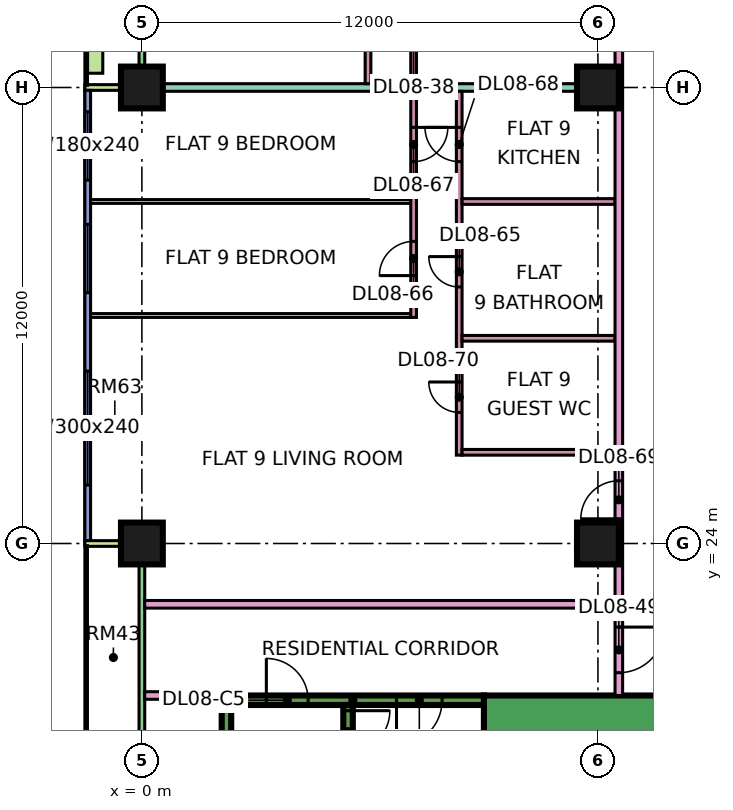
"""IFC4 building model, lengths in metres.
Left out: names, types, materials, properties, quantities, classifications, styles, units other than length and angle.
Written with IfcOpenShell. Run it as: python <this file> out.ifc"""

import sys

from ifc_helpers import new_model, si_unit, direction, frame, frame_2d, origin, origin_2d, place, context, subcontext, project, spatial, rectangle, extrude, element, fill, save


model = new_model("IFC4")
c1 = context("Model", 3, precision=1e-05, world=origin(), true_north=direction((0.0, 1.0)))
c2 = subcontext(c1, "Body", "Model", "MODEL_VIEW")
j1 = project(units=[si_unit("LENGTHUNIT", "METRE"), si_unit("PLANEANGLEUNIT", "RADIAN")], contexts=[c1])
p1 = place(None, origin())
s1 = spatial("IfcSite", under=j1, at=p1, CompositionType="ELEMENT")
p2 = place(p1, origin())
s2 = spatial("IfcBuilding", under=s1, at=p2, CompositionType="ELEMENT")
p3 = place(p2, frame((0.0, 0.0, 45.15)))
s3 = spatial("IfcBuildingStorey", under=s2, at=p3, CompositionType="ELEMENT", Elevation=45.15)
p4 = place(p3, frame((0.0, 24.0, 0.0), z_axis=(0.0, 0.0, 1.0), x_axis=(1.0, 0.0, 0.0)))
e1 = element("IfcColumn", 1, at=p4, inside=s3, PredefinedType="COLUMN", context=c2, shape_type="SweptSolid", body=[
    extrude(rectangle(XDim=1.1, YDim=1.1, at=origin_2d()), origin(), (0.0, 0.0, 1.0), 3.75),
])
p5 = place(p3, frame((0.0, 36.0, 0.0), z_axis=(0.0, 0.0, 1.0), x_axis=(1.0, 0.0, 0.0)))
e2 = element("IfcColumn", 2, at=p5, inside=s3, PredefinedType="COLUMN", context=c2, shape_type="SweptSolid", body=[
    extrude(rectangle(XDim=1.1, YDim=1.1, at=origin_2d()), origin(), (0.0, 0.0, 1.0), 3.75),
])
for number, where, z_axis, x_axis in (
    (3, (12.0, 24.0, 0.0), (0.0, 0.0, 1.0), (1.0, 0.0, 0.0)),
    (4, (12.0, 36.0, 0.0), (0.0, 0.0, 1.0), (1.0, 0.0, 0.0)),
):
    element("IfcColumn", number, at=place(p3, frame(where, z_axis=z_axis, x_axis=x_axis)), inside=s3, PredefinedType="COLUMN", context=c2, shape_type="SweptSolid", body=[
        extrude(rectangle(XDim=1.1, YDim=1.1, at=origin_2d()), origin(), (0.0, 0.0, 1.0), 3.75),
    ])
p6 = place(p3, frame((9.0, 19.45, 0.0), z_axis=(0.0, 0.0, 1.0), x_axis=(1.0, 0.0, 0.0)))
e5 = element("IfcWall", 5, at=p6, inside=s3, PredefinedType="SHEAR", context=c2, shape_type="SweptSolid", body=[
    extrude(rectangle(XDim=25.0, YDim=1.1, at=frame_2d((12.5, 0.0))), origin(), (0.0, 0.0, 1.0), 3.75),
])
p7 = place(p6, frame((19.1, 0.0, 0.0)))
e6 = element("IfcOpeningElement", 6, at=p7, cuts=e5, PredefinedType="OPENING", context=c2, shape_type="SweptSolid", body=[
    extrude(rectangle(XDim=1.8, YDim=2.4, at=frame_2d((0.9, 1.2))), frame((0.0, 0.56, 0.0), z_axis=(0.0, -1.0, 0.0), x_axis=(1.0, 0.0, 0.0)), (0.0, 0.0, 1.0), 1.12),
])
p8 = place(p3, frame((2.1, 19.875, 0.0), z_axis=(0.0, 0.0, 1.0), x_axis=(1.0, 0.0, 0.0)))
e7 = element("IfcWall", 7, at=p8, inside=s3, PredefinedType="SHEAR", context=c2, shape_type="SweptSolid", body=[
    extrude(rectangle(XDim=6.9, YDim=0.25, at=frame_2d((3.45, 0.0))), origin(), (0.0, 0.0, 1.0), 3.75),
])
p9 = place(p8, frame((1.175, 0.0, 0.0)))
e8 = element("IfcOpeningElement", 8, at=p9, cuts=e7, PredefinedType="OPENING", context=c2, shape_type="SweptSolid", body=[
    extrude(rectangle(XDim=1.1, YDim=2.2, at=frame_2d((0.55, 1.1))), frame((0.0, 0.135, 0.0), z_axis=(0.0, -1.0, 0.0), x_axis=(1.0, 0.0, 0.0)), (0.0, 0.0, 1.0), 0.27),
])
p10 = place(p8, frame((4.6, 0.0, 0.0)))
e9 = element("IfcOpeningElement", 9, at=p10, cuts=e7, PredefinedType="OPENING", context=c2, shape_type="SweptSolid", body=[
    extrude(rectangle(XDim=1.2, YDim=2.2, at=frame_2d((0.6, 1.1))), frame((0.0, 0.135, 0.0), z_axis=(0.0, -1.0, 0.0), x_axis=(1.0, 0.0, 0.0)), (0.0, 0.0, 1.0), 0.27),
])
p11 = place(p3, frame((2.225, 13.25, 0.0), z_axis=(0.0, 0.0, 1.0), x_axis=(0.0, 1.0, 0.0)))
e10 = element("IfcWall", 10, at=p11, inside=s3, PredefinedType="SHEAR", context=c2, shape_type="SweptSolid", body=[
    extrude(rectangle(XDim=6.5, YDim=0.25, at=frame_2d((3.25, 0.0))), origin(), (0.0, 0.0, 1.0), 3.75),
])
p12 = place(p3, frame((5.425, 13.25, 0.0), z_axis=(0.0, 0.0, 1.0), x_axis=(0.0, 1.0, 0.0)))
e11 = element("IfcWall", 11, at=p12, inside=s3, PredefinedType="SHEAR", context=c2, shape_type="SweptSolid", body=[
    extrude(rectangle(XDim=6.5, YDim=0.25, at=frame_2d((3.25, 0.0))), origin(), (0.0, 0.0, 1.0), 3.75),
])
p13 = place(p12, frame((5.25, 0.0, 0.0)))
e12 = element("IfcOpeningElement", 12, at=p13, cuts=e11, PredefinedType="OPENING", context=c2, shape_type="SweptSolid", body=[
    extrude(rectangle(XDim=1.1, YDim=2.2, at=frame_2d((0.55, 1.1))), frame((0.0, 0.135, 0.0), z_axis=(0.0, -1.0, 0.0), x_axis=(1.0, 0.0, 0.0)), (0.0, 0.0, 1.0), 0.27),
])
p14 = place(p3, frame((0.0, 47.925, 0.0), z_axis=(0.0, 0.0, 1.0), x_axis=(0.0, -1.0, 0.0)))
e13 = element("IfcWall", 13, at=p14, inside=s3, PredefinedType="SOLIDWALL", context=c2, shape_type="SweptSolid", body=[
    extrude(rectangle(XDim=11.85, YDim=0.15, at=frame_2d((5.925, 0.0))), origin(), (0.0, 0.0, 1.0), 3.35),
])
p15 = place(p14, frame((0.538, 0.0, 0.45)))
e14 = element("IfcOpeningElement", 14, at=p15, cuts=e13, PredefinedType="OPENING", context=c2, shape_type="SweptSolid", body=[
    extrude(rectangle(XDim=1.2, YDim=2.4, at=frame_2d((0.6, 1.2))), frame((0.0, 0.085, 0.0), z_axis=(0.0, -1.0, 0.0), x_axis=(1.0, 0.0, 0.0)), (0.0, 0.0, 1.0), 0.17),
])
p16 = place(p14, frame((5.35, 0.0, 0.0)))
e15 = element("IfcOpeningElement", 15, at=p16, cuts=e13, PredefinedType="OPENING", context=c2, shape_type="SweptSolid", body=[
    extrude(rectangle(XDim=1.8, YDim=2.4, at=frame_2d((0.9, 1.2))), frame((0.0, 0.085, 0.0), z_axis=(0.0, -1.0, 0.0), x_axis=(1.0, 0.0, 0.0)), (0.0, 0.0, 1.0), 0.17),
])
p17 = place(p14, frame((9.5, 0.0, 0.45)))
e16 = element("IfcOpeningElement", 16, at=p17, cuts=e13, PredefinedType="OPENING", context=c2, shape_type="SweptSolid", body=[
    extrude(rectangle(XDim=1.2, YDim=2.4, at=frame_2d((0.6, 1.2))), frame((0.0, 0.085, 0.0), z_axis=(0.0, -1.0, 0.0), x_axis=(1.0, 0.0, 0.0)), (0.0, 0.0, 1.0), 0.17),
])
p18 = place(p3, frame((-1.5, 36.0, 0.0), z_axis=(0.0, 0.0, 1.0), x_axis=(1.0, 0.0, 0.0)))
e17 = element("IfcWall", 17, at=p18, inside=s3, PredefinedType="SOLIDWALL", context=c2, shape_type="SweptSolid", body=[
    extrude(rectangle(XDim=1.5, YDim=0.15, at=frame_2d((0.75, 0.0))), origin(), (0.0, 0.0, 1.0), 3.35),
])
p19 = place(p3, frame((-1.425, 35.925, 0.0), z_axis=(0.0, 0.0, 1.0), x_axis=(0.0, -1.0, 0.0)))
e18 = element("IfcWall", 18, at=p19, inside=s3, PredefinedType="SOLIDWALL", context=c2, shape_type="SweptSolid", body=[
    extrude(rectangle(XDim=11.85, YDim=0.15, at=frame_2d((5.925, 0.0))), origin(), (0.0, 0.0, 1.0), 3.35),
])
p20 = place(p19, frame((0.562, 0.0, 0.45)))
e19 = element("IfcOpeningElement", 19, at=p20, cuts=e18, PredefinedType="OPENING", context=c2, shape_type="SweptSolid", body=[
    extrude(rectangle(XDim=1.8, YDim=2.4, at=frame_2d((0.9, 1.2))), frame((0.0, 0.085, 0.0), z_axis=(0.0, -1.0, 0.0), x_axis=(1.0, 0.0, 0.0)), (0.0, 0.0, 1.0), 0.17),
])
p21 = place(p19, frame((3.525, 0.0, 0.45)))
e20 = element("IfcOpeningElement", 20, at=p21, cuts=e18, PredefinedType="OPENING", context=c2, shape_type="SweptSolid", body=[
    extrude(rectangle(XDim=1.8, YDim=2.4, at=frame_2d((0.9, 1.2))), frame((0.0, 0.085, 0.0), z_axis=(0.0, -1.0, 0.0), x_axis=(1.0, 0.0, 0.0)), (0.0, 0.0, 1.0), 0.17),
])
p22 = place(p19, frame((7.387, 0.0, 0.45)))
e21 = element("IfcOpeningElement", 21, at=p22, cuts=e18, PredefinedType="OPENING", context=c2, shape_type="SweptSolid", body=[
    extrude(rectangle(XDim=3.0, YDim=2.4, at=frame_2d((1.5, 1.2))), frame((0.0, 0.085, 0.0), z_axis=(0.0, -1.0, 0.0), x_axis=(1.0, 0.0, 0.0)), (0.0, 0.0, 1.0), 0.17),
])
p23 = place(p3, frame((0.0, 23.925, 0.0), z_axis=(0.0, 0.0, 1.0), x_axis=(0.0, -1.0, 0.0)))
e22 = element("IfcWall", 22, at=p23, inside=s3, PredefinedType="SOLIDWALL", context=c2, shape_type="SweptSolid", body=[
    extrude(rectangle(XDim=11.35, YDim=0.15, at=frame_2d((5.675, 0.0))), origin(), (0.0, 0.0, 1.0), 3.35),
])
p24 = place(p23, frame((6.738, 0.0, 0.0)))
e23 = element("IfcOpeningElement", 23, at=p24, cuts=e22, PredefinedType="OPENING", context=c2, shape_type="SweptSolid", body=[
    extrude(rectangle(XDim=1.8, YDim=2.4, at=frame_2d((0.9, 1.2))), frame((0.0, 0.085, 0.0), z_axis=(0.0, -1.0, 0.0), x_axis=(1.0, 0.0, 0.0)), (0.0, 0.0, 1.0), 0.17),
])
p25 = place(p3, frame((-1.5, 24.0, 0.0), z_axis=(0.0, 0.0, 1.0), x_axis=(1.0, 0.0, 0.0)))
e24 = element("IfcWall", 24, at=p25, inside=s3, PredefinedType="SOLIDWALL", context=c2, shape_type="SweptSolid", body=[
    extrude(rectangle(XDim=1.5, YDim=0.15, at=frame_2d((0.75, 0.0))), origin(), (0.0, 0.0, 1.0), 3.35),
])
p26 = place(p3, frame((-1.229, 47.625, 0.0), z_axis=(0.0, 0.0, 1.0), x_axis=(0.0, -1.0, 0.0)))
e25 = element("IfcWall", 25, at=p26, inside=s3, PredefinedType="SOLIDWALL", context=c2, shape_type="SweptSolid", body=[
    extrude(rectangle(XDim=11.25, YDim=0.4, at=frame_2d((5.625, 0.0))), origin(), (0.0, 0.0, 1.0), 0.7),
])
p27 = place(p3, frame((-1.351, 33.0, 0.0), z_axis=(0.0, 0.0, 1.0), x_axis=(1.0, 0.0, 0.0)))
e26 = element("IfcWall", 26, at=p27, inside=s3, PredefinedType="PARTITIONING", context=c2, shape_type="SweptSolid", body=[
    extrude(rectangle(XDim=8.426, YDim=0.1, at=frame_2d((4.213, 0.0))), origin(), (0.0, 0.0, 1.0), 3.35),
])
p28 = place(p3, frame((-1.35, 30.0, 0.0), z_axis=(0.0, 0.0, 1.0), x_axis=(1.0, 0.0, 0.0)))
e27 = element("IfcWall", 27, at=p28, inside=s3, PredefinedType="PARTITIONING", context=c2, shape_type="SweptSolid", body=[
    extrude(rectangle(XDim=8.425, YDim=0.1, at=frame_2d((4.212, 0.0))), origin(), (0.0, 0.0, 1.0), 3.35),
])
e28 = element("IfcWall", 28, at=p5, inside=s3, PredefinedType="PARTITIONING", context=c2, shape_type="SweptSolid", body=[
    extrude(rectangle(XDim=12.45, YDim=0.2, at=frame_2d((6.225, 0.0))), origin(), (0.0, 0.0, 1.0), 3.35),
])
p29 = place(p3, frame((0.074, 20.0, 0.0), z_axis=(0.0, 0.0, 1.0), x_axis=(1.0, 0.0, 0.0)))
e29 = element("IfcWall", 29, at=p29, inside=s3, PredefinedType="PARTITIONING", context=c2, shape_type="SweptSolid", body=[
    extrude(rectangle(XDim=2.026, YDim=0.2, at=frame_2d((1.013, 0.0))), origin(), (0.0, 0.0, 1.0), 3.35),
])
p30 = place(p3, frame((0.074, 22.4, 0.0), z_axis=(0.0, 0.0, 1.0), x_axis=(1.0, 0.0, 0.0)))
e30 = element("IfcWall", 30, at=p30, inside=s3, PredefinedType="PARTITIONING", context=c2, shape_type="SweptSolid", body=[
    extrude(rectangle(XDim=12.376, YDim=0.2, at=frame_2d((6.188, 0.0))), origin(), (0.0, 0.0, 1.0), 3.35),
])
p31 = place(p3, frame((5.95, 36.1, 0.0), z_axis=(0.0, 0.0, 1.0), x_axis=(0.0, 1.0, 0.0)))
e31 = element("IfcWall", 31, at=p31, inside=s3, PredefinedType="PARTITIONING", context=c2, shape_type="SweptSolid", body=[
    extrude(rectangle(XDim=8.95, YDim=0.15, at=frame_2d((4.475, 0.0))), origin(), (0.0, 0.0, 1.0), 3.35),
])
p32 = place(p31, frame((0.95, 0.0, 0.0)))
e32 = element("IfcOpeningElement", 32, at=p32, cuts=e31, PredefinedType="OPENING", context=c2, shape_type="SweptSolid", body=[
    extrude(rectangle(XDim=0.9, YDim=2.1, at=frame_2d((0.45, 1.05))), frame((0.0, 0.085, 0.0), z_axis=(0.0, -1.0, 0.0), x_axis=(1.0, 0.0, 0.0)), (0.0, 0.0, 1.0), 0.17),
])
p33 = place(p31, frame((6.95, 0.0, 0.0)))
e33 = element("IfcOpeningElement", 33, at=p33, cuts=e31, PredefinedType="OPENING", context=c2, shape_type="SweptSolid", body=[
    extrude(rectangle(XDim=0.9, YDim=2.1, at=frame_2d((0.45, 1.05))), frame((0.0, 0.085, 0.0), z_axis=(0.0, -1.0, 0.0), x_axis=(1.0, 0.0, 0.0)), (0.0, 0.0, 1.0), 0.17),
])
p34 = place(p3, frame((7.15, 29.95, 0.0), z_axis=(0.0, 0.0, 1.0), x_axis=(0.0, 1.0, 0.0)))
e34 = element("IfcWall", 34, at=p34, inside=s3, PredefinedType="PARTITIONING", context=c2, shape_type="SweptSolid", body=[
    extrude(rectangle(XDim=5.95, YDim=0.15, at=frame_2d((2.975, 0.0))), origin(), (0.0, 0.0, 1.0), 3.35),
])
p35 = place(p34, frame((1.1, 0.0, 0.0)))
e35 = element("IfcOpeningElement", 35, at=p35, cuts=e34, PredefinedType="OPENING", context=c2, shape_type="SweptSolid", body=[
    extrude(rectangle(XDim=0.9, YDim=2.1, at=frame_2d((0.45, 1.05))), frame((0.0, 0.085, 0.0), z_axis=(0.0, -1.0, 0.0), x_axis=(1.0, 0.0, 0.0)), (0.0, 0.0, 1.0), 0.17),
])
p36 = place(p34, frame((4.1, 0.0, 0.0)))
e36 = element("IfcOpeningElement", 36, at=p36, cuts=e34, PredefinedType="OPENING", context=c2, shape_type="SweptSolid", body=[
    extrude(rectangle(XDim=0.9, YDim=2.1, at=frame_2d((0.45, 1.05))), frame((0.0, 0.085, 0.0), z_axis=(0.0, -1.0, 0.0), x_axis=(1.0, 0.0, 0.0)), (0.0, 0.0, 1.0), 0.17),
])
p37 = place(p3, frame((7.15, 36.1, 0.0), z_axis=(0.0, 0.0, 1.0), x_axis=(0.0, 1.0, 0.0)))
e37 = element("IfcWall", 37, at=p37, inside=s3, PredefinedType="PARTITIONING", context=c2, shape_type="SweptSolid", body=[
    extrude(rectangle(XDim=9.275, YDim=0.15, at=frame_2d((4.637, 0.0))), origin(), (0.0, 0.0, 1.0), 3.35),
])
p38 = place(p37, frame((7.4, 0.0, 0.0)))
e38 = element("IfcOpeningElement", 38, at=p38, cuts=e37, PredefinedType="OPENING", context=c2, shape_type="SweptSolid", body=[
    extrude(rectangle(XDim=0.8, YDim=2.1, at=frame_2d((0.4, 1.05))), frame((0.0, 0.085, 0.0), z_axis=(0.0, -1.0, 0.0), x_axis=(1.0, 0.0, 0.0)), (0.0, 0.0, 1.0), 0.17),
])
p39 = place(p37, frame((1.1, 0.0, 0.0)))
e39 = element("IfcOpeningElement", 39, at=p39, cuts=e37, PredefinedType="OPENING", context=c2, shape_type="SweptSolid", body=[
    extrude(rectangle(XDim=0.8, YDim=2.1, at=frame_2d((0.4, 1.05))), frame((0.0, 0.085, 0.0), z_axis=(0.0, -1.0, 0.0), x_axis=(1.0, 0.0, 0.0)), (0.0, 0.0, 1.0), 0.17),
])
p40 = place(p37, frame((4.4, 0.0, 0.0)))
e40 = element("IfcOpeningElement", 40, at=p40, cuts=e37, PredefinedType="OPENING", context=c2, shape_type="SweptSolid", body=[
    extrude(rectangle(XDim=0.8, YDim=2.1, at=frame_2d((0.4, 1.05))), frame((0.0, 0.085, 0.0), z_axis=(0.0, -1.0, 0.0), x_axis=(1.0, 0.0, 0.0)), (0.0, 0.0, 1.0), 0.17),
])
p41 = place(p3, frame((8.35, 26.325, 0.0), z_axis=(0.0, 0.0, 1.0), x_axis=(0.0, 1.0, 0.0)))
e41 = element("IfcWall", 41, at=p41, inside=s3, PredefinedType="PARTITIONING", context=c2, shape_type="SweptSolid", body=[
    extrude(rectangle(XDim=9.575, YDim=0.15, at=frame_2d((4.788, 0.0))), origin(), (0.0, 0.0, 1.0), 3.35),
])
p42 = place(p41, frame((4.425, 0.0, 0.0)))
e42 = element("IfcOpeningElement", 42, at=p42, cuts=e41, PredefinedType="OPENING", context=c2, shape_type="SweptSolid", body=[
    extrude(rectangle(XDim=0.8, YDim=2.1, at=frame_2d((0.4, 1.05))), frame((0.0, 0.085, 0.0), z_axis=(0.0, -1.0, 0.0), x_axis=(1.0, 0.0, 0.0)), (0.0, 0.0, 1.0), 0.17),
])
p43 = place(p41, frame((7.725, 0.0, 0.0)))
e43 = element("IfcOpeningElement", 43, at=p43, cuts=e41, PredefinedType="OPENING", context=c2, shape_type="SweptSolid", body=[
    extrude(rectangle(XDim=0.9, YDim=2.1, at=frame_2d((0.45, 1.05))), frame((0.0, 0.085, 0.0), z_axis=(0.0, -1.0, 0.0), x_axis=(1.0, 0.0, 0.0)), (0.0, 0.0, 1.0), 0.17),
])
p44 = place(p41, frame((1.125, 0.0, 0.0)))
e44 = element("IfcOpeningElement", 44, at=p44, cuts=e41, PredefinedType="OPENING", context=c2, shape_type="SweptSolid", body=[
    extrude(rectangle(XDim=0.8, YDim=2.1, at=frame_2d((0.4, 1.05))), frame((0.0, 0.085, 0.0), z_axis=(0.0, -1.0, 0.0), x_axis=(1.0, 0.0, 0.0)), (0.0, 0.0, 1.0), 0.17),
])
for number, where, z_axis, x_axis in (
    (45, (8.425, 26.4, 0.0), (0.0, 0.0, 1.0), (1.0, 0.0, 0.0)),
    (46, (8.425, 29.4, 0.0), (0.0, 0.0, 1.0), (1.0, 0.0, 0.0)),
    (47, (8.425, 33.0, 0.0), (0.0, 0.0, 1.0), (1.0, 0.0, 0.0)),
):
    element("IfcWall", number, at=place(p3, frame(where, z_axis=z_axis, x_axis=x_axis)), inside=s3, PredefinedType="PARTITIONING", context=c2, shape_type="SweptSolid", body=[
        extrude(rectangle(XDim=4.025, YDim=0.15, at=frame_2d((2.012, 0.0))), origin(), (0.0, 0.0, 1.0), 3.35),
    ])
p45 = place(p3, frame((12.55, 20.0, 0.0), z_axis=(0.0, 0.0, 1.0), x_axis=(0.0, 1.0, 0.0)))
e48 = element("IfcWall", 48, at=p45, inside=s3, PredefinedType="PARTITIONING", context=c2, shape_type="SweptSolid", body=[
    extrude(rectangle(XDim=42.926, YDim=0.2, at=frame_2d((21.463, 0.0))), origin(), (0.0, 0.0, 1.0), 3.35),
])
p46 = place(p45, frame((25.8, 0.0, 0.0)))
e49 = element("IfcOpeningElement", 49, at=p46, cuts=e48, PredefinedType="OPENING", context=c2, shape_type="SweptSolid", body=[
    extrude(rectangle(XDim=1.0, YDim=2.1, at=frame_2d((0.5, 1.05))), frame((0.0, 0.11, 0.0), z_axis=(0.0, -1.0, 0.0), x_axis=(1.0, 0.0, 0.0)), (0.0, 0.0, 1.0), 0.22),
])
p47 = place(p45, frame((37.65, 0.0, 0.0)))
e50 = element("IfcOpeningElement", 50, at=p47, cuts=e48, PredefinedType="OPENING", context=c2, shape_type="SweptSolid", body=[
    extrude(rectangle(XDim=1.0, YDim=2.1, at=frame_2d((0.5, 1.05))), frame((0.0, 0.11, 0.0), z_axis=(0.0, -1.0, 0.0), x_axis=(1.0, 0.0, 0.0)), (0.0, 0.0, 1.0), 0.22),
])
p48 = place(p45, frame((0.6, 0.0, 0.0)))
e51 = element("IfcOpeningElement", 51, at=p48, cuts=e48, PredefinedType="OPENING", context=c2, shape_type="SweptSolid", body=[
    extrude(rectangle(XDim=1.2, YDim=2.1, at=frame_2d((0.6, 1.05))), frame((0.0, 0.11, 0.0), z_axis=(0.0, -1.0, 0.0), x_axis=(1.0, 0.0, 0.0)), (0.0, 0.0, 1.0), 0.22),
])
p49 = place(p45, frame((4.65, 0.0, 0.0)))
e52 = element("IfcOpeningElement", 52, at=p49, cuts=e48, PredefinedType="OPENING", context=c2, shape_type="SweptSolid", body=[
    extrude(rectangle(XDim=1.0, YDim=2.1, at=frame_2d((0.5, 1.05))), frame((0.0, 0.11, 0.0), z_axis=(0.0, -1.0, 0.0), x_axis=(1.0, 0.0, 0.0)), (0.0, 0.0, 1.0), 0.22),
])
p50 = place(p20, origin())
e53 = element("IfcWindow", 53, at=p50, inside=s3, PartitioningType="SINGLE_PANEL", PredefinedType="WINDOW", context=c2, shape_type="SweptSolid", body=[
    extrude(rectangle(XDim=1.8, YDim=2.4, at=frame_2d((0.9, 1.2))), frame((0.0, 0.03, 0.0), z_axis=(0.0, -1.0, 0.0), x_axis=(1.0, 0.0, 0.0)), (0.0, 0.0, 1.0), 0.06),
])
fill(e19, e53)
p51 = place(p21, origin())
e54 = element("IfcWindow", 54, at=p51, inside=s3, PartitioningType="SINGLE_PANEL", PredefinedType="WINDOW", context=c2, shape_type="SweptSolid", body=[
    extrude(rectangle(XDim=1.8, YDim=2.4, at=frame_2d((0.9, 1.2))), frame((0.0, 0.03, 0.0), z_axis=(0.0, -1.0, 0.0), x_axis=(1.0, 0.0, 0.0)), (0.0, 0.0, 1.0), 0.06),
])
fill(e20, e54)
p52 = place(p22, origin())
e55 = element("IfcWindow", 55, at=p52, inside=s3, PartitioningType="SINGLE_PANEL", PredefinedType="WINDOW", context=c2, shape_type="SweptSolid", body=[
    extrude(rectangle(XDim=3.0, YDim=2.4, at=frame_2d((1.5, 1.2))), frame((0.0, 0.03, 0.0), z_axis=(0.0, -1.0, 0.0), x_axis=(1.0, 0.0, 0.0)), (0.0, 0.0, 1.0), 0.06),
])
fill(e21, e55)
p53 = place(p13, origin())
e56 = element("IfcDoor", 56, at=p53, inside=s3, OperationType="SINGLE_SWING_RIGHT", PredefinedType="DOOR", context=c2, shape_type="SweptSolid", body=[
    extrude(rectangle(XDim=1.1, YDim=2.2, at=frame_2d((0.55, 1.1))), frame((0.0, 0.025, 0.0), z_axis=(0.0, -1.0, 0.0), x_axis=(1.0, 0.0, 0.0)), (0.0, 0.0, 1.0), 0.05),
])
fill(e12, e56)
p54 = place(p9, origin())
e57 = element("IfcDoor", 57, at=p54, inside=s3, OperationType="SINGLE_SWING_LEFT", PredefinedType="DOOR", context=c2, shape_type="SweptSolid", body=[
    extrude(rectangle(XDim=1.1, YDim=2.2, at=frame_2d((0.55, 1.1))), frame((0.0, 0.025, 0.0), z_axis=(0.0, -1.0, 0.0), x_axis=(1.0, 0.0, 0.0)), (0.0, 0.0, 1.0), 0.05),
])
fill(e8, e57)
p55 = place(p10, frame((1.2, 0.0, 0.0), z_axis=(0.0, 0.0, 1.0), x_axis=(-1.0, 0.0, 0.0)))
e58 = element("IfcDoor", 58, at=p55, inside=s3, OperationType="SINGLE_SWING_LEFT", PredefinedType="DOOR", context=c2, shape_type="SweptSolid", body=[
    extrude(rectangle(XDim=1.2, YDim=2.2, at=frame_2d((0.6, 1.1))), frame((0.0, 0.025, 0.0), z_axis=(0.0, -1.0, 0.0), x_axis=(1.0, 0.0, 0.0)), (0.0, 0.0, 1.0), 0.05),
])
fill(e9, e58)
p56 = place(p48, origin())
e59 = element("IfcDoor", 59, at=p56, inside=s3, OperationType="SINGLE_SWING_RIGHT", PredefinedType="DOOR", context=c2, shape_type="SweptSolid", body=[
    extrude(rectangle(XDim=1.2, YDim=2.1, at=frame_2d((0.6, 1.05))), frame((0.0, 0.025, 0.0), z_axis=(0.0, -1.0, 0.0), x_axis=(1.0, 0.0, 0.0)), (0.0, 0.0, 1.0), 0.05),
])
fill(e51, e59)
p57 = place(p42, frame((0.8, 0.0, 0.0), z_axis=(0.0, 0.0, 1.0), x_axis=(-1.0, 0.0, 0.0)))
e60 = element("IfcDoor", 60, at=p57, inside=s3, OperationType="SINGLE_SWING_RIGHT", PredefinedType="DOOR", context=c2, shape_type="SweptSolid", body=[
    extrude(rectangle(XDim=0.8, YDim=2.1, at=frame_2d((0.4, 1.05))), frame((0.0, 0.025, 0.0), z_axis=(0.0, -1.0, 0.0), x_axis=(1.0, 0.0, 0.0)), (0.0, 0.0, 1.0), 0.05),
])
fill(e42, e60)
p58 = place(p35, origin())
e61 = element("IfcDoor", 61, at=p58, inside=s3, OperationType="SINGLE_SWING_LEFT", PredefinedType="DOOR", context=c2, shape_type="SweptSolid", body=[
    extrude(rectangle(XDim=0.9, YDim=2.1, at=frame_2d((0.45, 1.05))), frame((0.0, 0.025, 0.0), z_axis=(0.0, -1.0, 0.0), x_axis=(1.0, 0.0, 0.0)), (0.0, 0.0, 1.0), 0.05),
])
fill(e35, e61)
p59 = place(p36, origin())
e62 = element("IfcDoor", 62, at=p59, inside=s3, OperationType="SINGLE_SWING_RIGHT", PredefinedType="DOOR", context=c2, shape_type="SweptSolid", body=[
    extrude(rectangle(XDim=0.9, YDim=2.1, at=frame_2d((0.45, 1.05))), frame((0.0, 0.025, 0.0), z_axis=(0.0, -1.0, 0.0), x_axis=(1.0, 0.0, 0.0)), (0.0, 0.0, 1.0), 0.05),
])
fill(e36, e62)
p60 = place(p43, frame((0.9, 0.0, 0.0), z_axis=(0.0, 0.0, 1.0), x_axis=(-1.0, 0.0, 0.0)))
e63 = element("IfcDoor", 63, at=p60, inside=s3, OperationType="SINGLE_SWING_RIGHT", PredefinedType="DOOR", context=c2, shape_type="SweptSolid", body=[
    extrude(rectangle(XDim=0.9, YDim=2.1, at=frame_2d((0.45, 1.05))), frame((0.0, 0.025, 0.0), z_axis=(0.0, -1.0, 0.0), x_axis=(1.0, 0.0, 0.0)), (0.0, 0.0, 1.0), 0.05),
])
fill(e43, e63)
p61 = place(p49, origin())
e64 = element("IfcDoor", 64, at=p61, inside=s3, OperationType="SINGLE_SWING_LEFT", PredefinedType="DOOR", context=c2, shape_type="SweptSolid", body=[
    extrude(rectangle(XDim=1.0, YDim=2.1, at=frame_2d((0.5, 1.05))), frame((0.0, 0.025, 0.0), z_axis=(0.0, -1.0, 0.0), x_axis=(1.0, 0.0, 0.0)), (0.0, 0.0, 1.0), 0.05),
])
fill(e52, e64)
p62 = place(p44, frame((0.8, 0.0, 0.0), z_axis=(0.0, 0.0, 1.0), x_axis=(-1.0, 0.0, 0.0)))
e65 = element("IfcDoor", 65, at=p62, inside=s3, OperationType="SINGLE_SWING_RIGHT", PredefinedType="DOOR", context=c2, shape_type="SweptSolid", body=[
    extrude(rectangle(XDim=0.8, YDim=2.1, at=frame_2d((0.4, 1.05))), frame((0.0, 0.025, 0.0), z_axis=(0.0, -1.0, 0.0), x_axis=(1.0, 0.0, 0.0)), (0.0, 0.0, 1.0), 0.05),
])
fill(e44, e65)
save(model, sys.argv[1])
